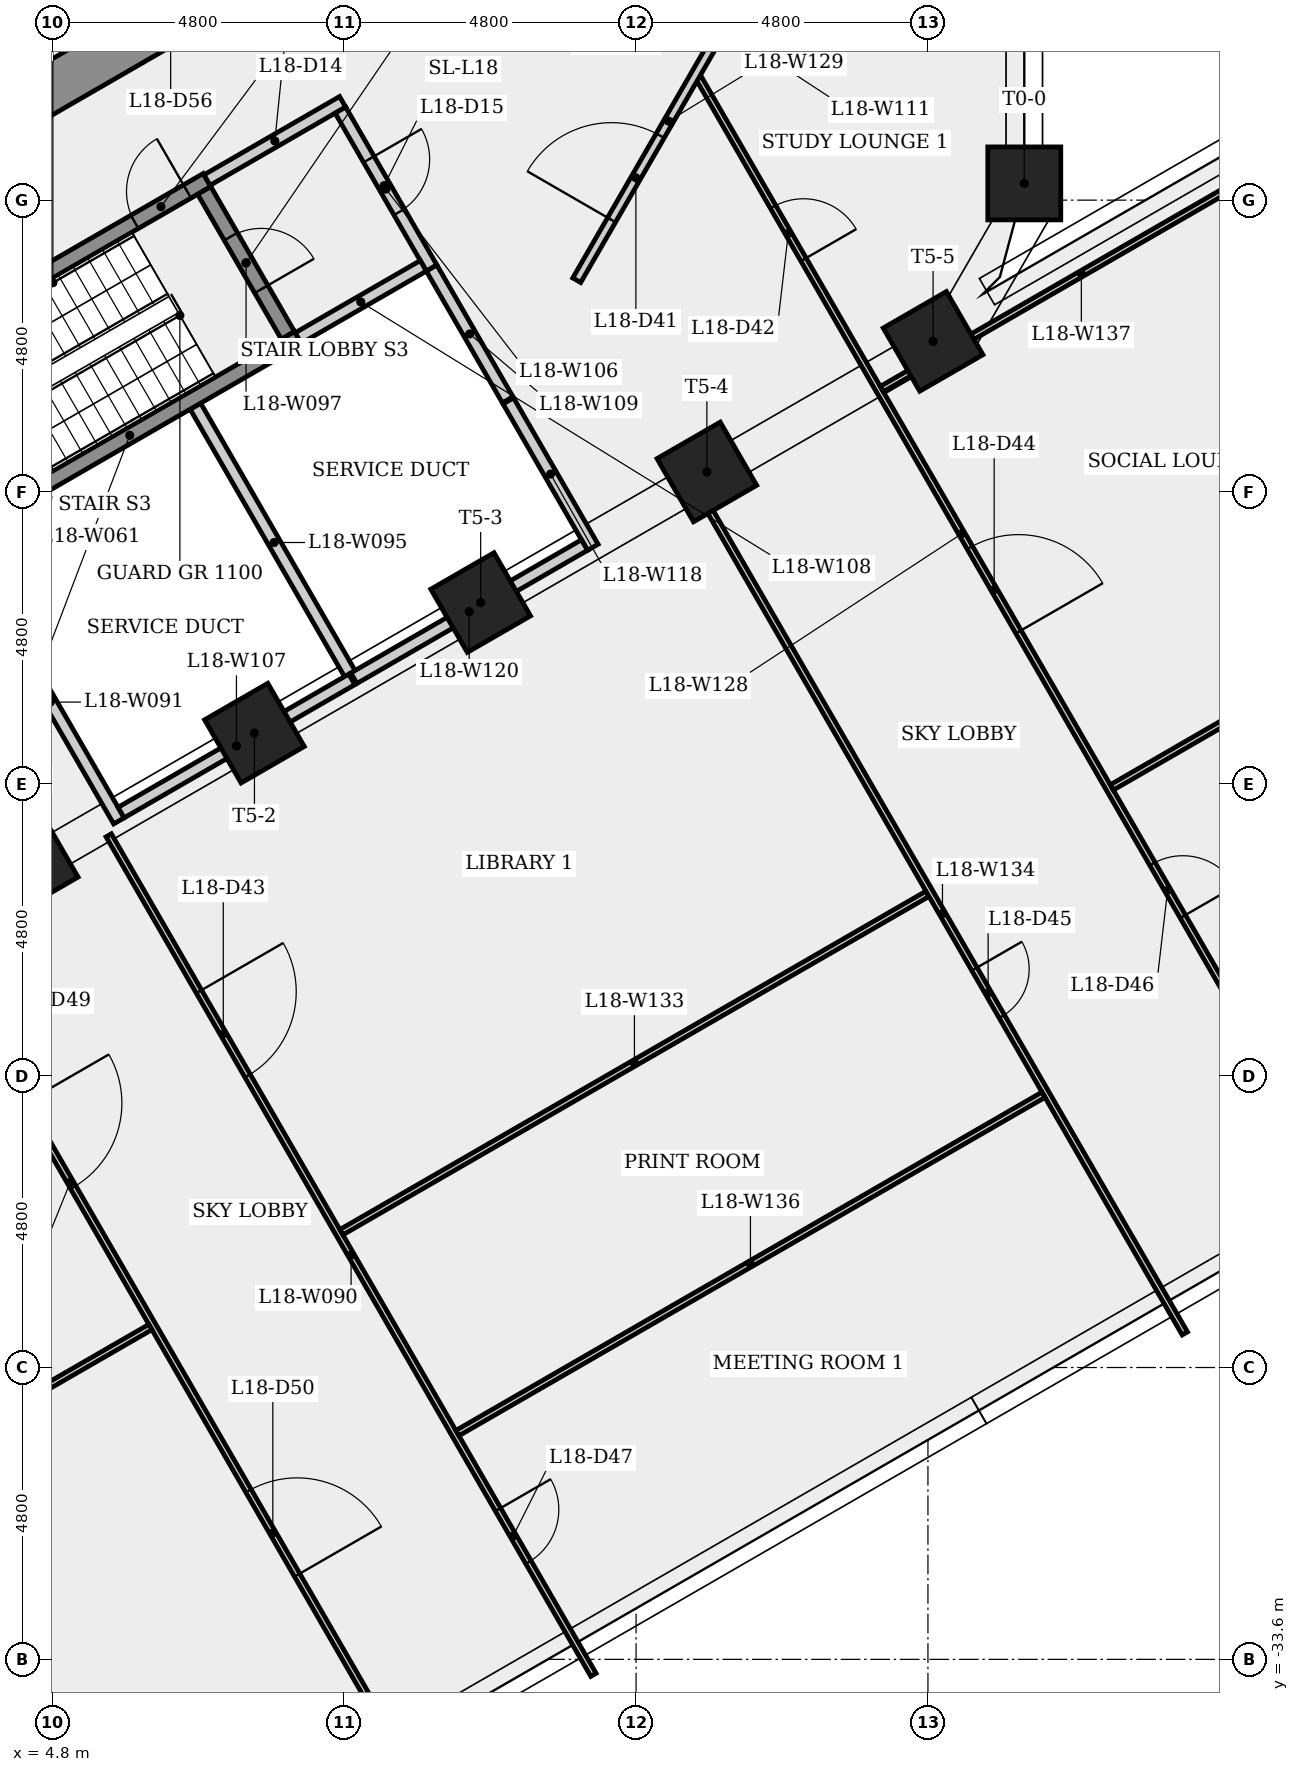
"""IFC4 building model, lengths in metres.
Left out: names, types, materials, properties, quantities, classifications, styles, units other than length and angle.
Written with IfcOpenShell. Run it as: python <this file> out.ifc"""

import sys

from ifc_helpers import new_model, si_unit, direction, frame, frame_2d, origin, origin_2d, place, context, subcontext, project, spatial, rectangle, extrude, element, fill, save


model = new_model("IFC4")
c1 = context("Model", 3, precision=1e-05, world=origin(), true_north=direction((0.0, 1.0)))
c2 = subcontext(c1, "Body", "Model", "MODEL_VIEW")
j1 = project(units=[si_unit("LENGTHUNIT", "METRE"), si_unit("PLANEANGLEUNIT", "RADIAN")], contexts=[c1])
p1 = place(None, origin())
s1 = spatial("IfcSite", under=j1, at=p1, CompositionType="ELEMENT")
p2 = place(p1, origin())
s2 = spatial("IfcBuilding", under=s1, at=p2, CompositionType="ELEMENT")
p3 = place(p2, frame((0.0, 0.0, 70.3)))
s3 = spatial("IfcBuildingStorey", under=s2, at=p3, CompositionType="ELEMENT", Elevation=70.3)
p4 = place(p3, frame((-0.2, -10.623, 0.0), z_axis=(0.0, 0.0, 1.0), x_axis=(0.866023993627, 0.500002442456, 0.0)))
e1 = element("IfcWall", 1, at=p4, inside=s3, PredefinedType="SHEAR", context=c2, shape_type="SweptSolid", body=[
    extrude(rectangle(XDim=10.97, YDim=0.8, at=frame_2d((5.485, 0.0))), origin(), (0.0, 0.0, 1.0), 4.0),
])
p5 = place(p4, frame((7.57, 0.0, 0.0)))
e2 = element("IfcOpeningElement", 2, at=p5, cuts=e1, PredefinedType="OPENING", context=c2, shape_type="SweptSolid", body=[
    extrude(rectangle(XDim=0.9, YDim=2.1, at=frame_2d((0.45, 1.05))), frame((0.0, 0.41, 0.0), z_axis=(0.0, -1.0, 0.0), x_axis=(1.0, 0.0, 0.0)), (0.0, 0.0, 1.0), 0.82),
])
for number, where, z_axis, x_axis in (
    (3, (20.785, -9.325, 0.0), (0.0, 0.0, 1.0), (1.0, 0.0, 0.0)),
    (4, (4.403, -20.514, 0.0), (0.0, 0.0, 1.0), (0.5, -0.866, 0.0)),
    (5, (8.124, -18.366, 0.0), (0.0, 0.0, 1.0), (0.5, -0.866, 0.0)),
    (6, (11.844, -16.219, 0.0), (0.0, 0.0, 1.0), (0.5, -0.866, 0.0)),
    (7, (15.564, -14.071, 0.0), (0.0, 0.0, 1.0), (0.5, -0.866, 0.0)),
    (8, (19.285, -11.923, 0.0), (0.0, 0.0, 1.0), (0.5, -0.866, 0.0)),
):
    element("IfcColumn", number, at=place(p3, frame(where, z_axis=z_axis, x_axis=x_axis)), inside=s3, PredefinedType="COLUMN", context=c2, shape_type="SweptSolid", body=[
        extrude(rectangle(XDim=1.2, YDim=1.2, at=origin_2d()), origin(), (0.0, 0.0, 1.0), 4.0),
    ])
p6 = place(p3, frame((1.585, -12.595, 0.0), z_axis=(0.0, 0.0, 1.0), x_axis=(0.866036417653, 0.499980922934, 0.0)))
e9 = element("IfcWall", 9, at=p6, inside=s3, PredefinedType="SHEAR", context=c2, shape_type="SweptSolid", body=[
    extrude(rectangle(XDim=6.65, YDim=0.25, at=frame_2d((3.325, 0.0))), origin(), (0.0, 0.0, 1.0), 3.6),
])
p7 = place(p6, frame((5.275, 0.0, 0.0)))
e10 = element("IfcOpeningElement", 10, at=p7, cuts=e9, PredefinedType="OPENING", context=c2, shape_type="SweptSolid", body=[
    extrude(rectangle(XDim=1.0, YDim=2.1, at=frame_2d((0.5, 1.05))), frame((0.0, 0.135, 0.0), z_axis=(0.0, -1.0, 0.0), x_axis=(1.0, 0.0, 0.0)), (0.0, 0.0, 1.0), 0.27),
])
p8 = place(p3, frame((-0.565, -15.949, 0.0), z_axis=(0.0, 0.0, 1.0), x_axis=(0.500000334318, -0.866025210766, 0.0)))
e11 = element("IfcWall", 11, at=p8, inside=s3, PredefinedType="PARTITIONING", context=c2, shape_type="SweptSolid", body=[
    extrude(rectangle(XDim=22.638, YDim=0.1, at=frame_2d((11.319, 0.0))), origin(), (0.0, 0.0, 1.0), 3.6),
])
p9 = place(p8, frame((3.081, 0.0, 0.0)))
e12 = element("IfcOpeningElement", 12, at=p9, cuts=e11, PredefinedType="OPENING", context=c2, shape_type="SweptSolid", body=[
    extrude(rectangle(XDim=1.0, YDim=2.1, at=frame_2d((0.5, 1.05))), frame((0.0, 0.06, 0.0), z_axis=(0.0, -1.0, 0.0), x_axis=(1.0, 0.0, 0.0)), (0.0, 0.0, 1.0), 0.12),
])
p10 = place(p8, frame((9.817, 0.0, 0.0)))
e13 = element("IfcOpeningElement", 13, at=p10, cuts=e11, PredefinedType="OPENING", context=c2, shape_type="SweptSolid", body=[
    extrude(rectangle(XDim=1.6, YDim=2.1, at=frame_2d((0.8, 1.05))), frame((0.0, 0.06, 0.0), z_axis=(0.0, -1.0, 0.0), x_axis=(1.0, 0.0, 0.0)), (0.0, 0.0, 1.0), 0.12),
])
p11 = place(p8, frame((17.182, 0.0, 0.0)))
e14 = element("IfcOpeningElement", 14, at=p11, cuts=e11, PredefinedType="OPENING", context=c2, shape_type="SweptSolid", body=[
    extrude(rectangle(XDim=1.6, YDim=2.1, at=frame_2d((0.8, 1.05))), frame((0.0, 0.06, 0.0), z_axis=(0.0, -1.0, 0.0), x_axis=(1.0, 0.0, 0.0)), (0.0, 0.0, 1.0), 0.12),
])
p12 = place(p3, frame((5.727, -20.047, 0.0), z_axis=(0.0, 0.0, 1.0), x_axis=(0.49999285859, -0.86602952684, 0.0)))
e15 = element("IfcWall", 15, at=p12, inside=s3, PredefinedType="PARTITIONING", context=c2, shape_type="SweptSolid", body=[
    extrude(rectangle(XDim=15.944, YDim=0.1, at=frame_2d((7.972, 0.0))), origin(), (0.0, 0.0, 1.0), 3.6),
])
p13 = place(p12, frame((2.968, 0.0, 0.0)))
e16 = element("IfcOpeningElement", 16, at=p13, cuts=e15, PredefinedType="OPENING", context=c2, shape_type="SweptSolid", body=[
    extrude(rectangle(XDim=1.6, YDim=2.1, at=frame_2d((0.8, 1.05))), frame((0.0, 0.06, 0.0), z_axis=(0.0, -1.0, 0.0), x_axis=(1.0, 0.0, 0.0)), (0.0, 0.0, 1.0), 0.12),
])
p14 = place(p12, frame((12.805, 0.0, 0.0)))
e17 = element("IfcOpeningElement", 17, at=p14, cuts=e15, PredefinedType="OPENING", context=c2, shape_type="SweptSolid", body=[
    extrude(rectangle(XDim=1.0, YDim=2.1, at=frame_2d((0.5, 1.05))), frame((0.0, 0.06, 0.0), z_axis=(0.0, -1.0, 0.0), x_axis=(1.0, 0.0, 0.0)), (0.0, 0.0, 1.0), 0.12),
])
p15 = place(p3, frame((5.894, -19.809, 0.0), z_axis=(0.0, 0.0, 1.0), x_axis=(-0.499980071345, 0.866036909293, 0.0)))
e18 = element("IfcWall", 18, at=p15, inside=s3, PredefinedType="PLUMBINGWALL", context=c2, shape_type="SweptSolid", body=[
    extrude(rectangle(XDim=4.512, YDim=0.2, at=frame_2d((2.256, 0.0))), origin(), (0.0, 0.0, 1.0), 3.6),
])
p16 = place(p3, frame((6.412, -28.134, 0.0), z_axis=(0.0, 0.0, 1.0), x_axis=(-0.86603149334, -0.499989452433, 0.0)))
e19 = element("IfcWall", 19, at=p16, inside=s3, PredefinedType="PARTITIONING", context=c2, shape_type="SweptSolid", body=[
    extrude(rectangle(XDim=13.482, YDim=0.1, at=frame_2d((6.741, 0.0))), origin(), (0.0, 0.0, 1.0), 3.6),
])
p17 = place(p3, frame((7.153, -12.989, 0.0), z_axis=(0.0, 0.0, 1.0), x_axis=(0.499993196246, -0.866029331898, 0.0)))
e20 = element("IfcWall", 20, at=p17, inside=s3, PredefinedType="PLUMBINGWALL", context=c2, shape_type="SweptSolid", body=[
    extrude(rectangle(XDim=5.178, YDim=0.2, at=frame_2d((2.589, 0.0))), origin(), (0.0, 0.0, 1.0), 3.6),
])
p18 = place(p3, frame((3.301, -15.068, 0.0), z_axis=(0.0, 0.0, 1.0), x_axis=(0.866035036182, 0.499983315828, 0.0)))
e21 = element("IfcWall", 21, at=p18, inside=s3, PredefinedType="SHEAR", context=c2, shape_type="SweptSolid", body=[
    extrude(rectangle(XDim=6.4, YDim=0.25, at=frame_2d((3.2, 0.0))), origin(), (0.0, 0.0, 1.0), 4.0),
])
p19 = place(p3, frame((7.298, -9.441, 0.0), z_axis=(0.0, 0.0, 1.0), x_axis=(0.500034990121, -0.866005201286, 0.0)))
e22 = element("IfcWall", 22, at=p19, inside=s3, PredefinedType="SHEAR", context=c2, shape_type="SweptSolid", body=[
    extrude(rectangle(XDim=2.75, YDim=0.25, at=frame_2d((1.375, 0.0))), origin(), (0.0, 0.0, 1.0), 3.6),
])
p20 = place(p19, frame((0.875, 0.0, 0.0)))
e23 = element("IfcOpeningElement", 23, at=p20, cuts=e22, PredefinedType="OPENING", context=c2, shape_type="SweptSolid", body=[
    extrude(rectangle(XDim=1.0, YDim=2.1, at=frame_2d((0.5, 1.05))), frame((0.0, 0.135, 0.0), z_axis=(0.0, -1.0, 0.0), x_axis=(1.0, 0.0, 0.0)), (0.0, 0.0, 1.0), 0.27),
])
p21 = place(p3, frame((7.344, -9.27, 0.0), z_axis=(0.0, 0.0, 1.0), x_axis=(0.866005588531, 0.500034319456, 0.0)))
e24 = element("IfcWall", 24, at=p21, inside=s3, PredefinedType="PARTITIONING", context=c2, shape_type="SweptSolid", body=[
    extrude(rectangle(XDim=2.575, YDim=0.2, at=frame_2d((1.288, 0.0))), origin(), (0.0, 0.0, 1.0), 3.6),
])
p22 = place(p3, frame((9.537, -8.119, 0.0), z_axis=(0.0, 0.0, 1.0), x_axis=(0.499990139034, -0.866031096941, 0.0)))
e25 = element("IfcWall", 25, at=p22, inside=s3, PredefinedType="PARTITIONING", context=c2, shape_type="SweptSolid", body=[
    extrude(rectangle(XDim=3.0, YDim=0.2, at=frame_2d((1.5, 0.0))), origin(), (0.0, 0.0, 1.0), 3.6),
])
p23 = place(p22, frame((0.935, 0.0, 0.0)))
e26 = element("IfcOpeningElement", 26, at=p23, cuts=e25, PredefinedType="OPENING", context=c2, shape_type="SweptSolid", body=[
    extrude(rectangle(XDim=1.0, YDim=2.1, at=frame_2d((0.5, 1.05))), frame((0.0, 0.11, 0.0), z_axis=(0.0, -1.0, 0.0), x_axis=(1.0, 0.0, 0.0)), (0.0, 0.0, 1.0), 0.22),
])
p24 = place(p3, frame((9.724, -17.483, 0.0), z_axis=(0.0, 0.0, 1.0), x_axis=(-0.866032430508, -0.49998782916, 0.0)))
e27 = element("IfcWall", 27, at=p24, inside=s3, PredefinedType="PLUMBINGWALL", context=c2, shape_type="SweptSolid", body=[
    extrude(rectangle(XDim=4.38, YDim=0.2, at=frame_2d((2.19, 0.0))), origin(), (0.0, 0.0, 1.0), 2.675),
])
p25 = place(p3, frame((10.901, -10.681, 0.0), z_axis=(0.0, 0.0, 1.0), x_axis=(-0.866007538022, -0.500030943131, 0.0)))
e28 = element("IfcWall", 28, at=p25, inside=s3, PredefinedType="PLUMBINGWALL", context=c2, shape_type="SweptSolid", body=[
    extrude(rectangle(XDim=2.375, YDim=0.2, at=frame_2d((1.188, 0.0))), origin(), (0.0, 0.0, 1.0), 3.6),
])
p26 = place(p3, frame((11.037, -10.717, 0.0), z_axis=(0.0, 0.0, 1.0), x_axis=(0.499989877761, -0.866031247783, 0.0)))
e29 = element("IfcWall", 29, at=p26, inside=s3, PredefinedType="PLUMBINGWALL", context=c2, shape_type="SweptSolid", body=[
    extrude(rectangle(XDim=2.502, YDim=0.2, at=frame_2d((1.251, 0.0))), origin(), (0.0, 0.0, 1.0), 3.6),
])
p27 = place(p3, frame((12.299, -12.902, 0.0), z_axis=(0.0, 0.0, 1.0), x_axis=(0.500049332001, -0.865996920067, 0.0)))
e30 = element("IfcWall", 30, at=p27, inside=s3, PredefinedType="PLUMBINGWALL", context=c2, shape_type="SweptSolid", body=[
    extrude(rectangle(XDim=2.78, YDim=0.2, at=frame_2d((1.39, 0.0))), origin(), (0.0, 0.0, 1.0), 3.6),
])
p28 = place(p3, frame((13.552, -15.273, 0.0), z_axis=(0.0, 0.0, 1.0), x_axis=(-0.866008294434, -0.500029633093, 0.0)))
e31 = element("IfcWall", 31, at=p28, inside=s3, PredefinedType="PLUMBINGWALL", context=c2, shape_type="SweptSolid", body=[
    extrude(rectangle(XDim=4.38, YDim=0.2, at=frame_2d((2.19, 0.0))), origin(), (0.0, 0.0, 1.0), 2.675),
])
p29 = place(p3, frame((15.425, -7.583, 0.0), z_axis=(0.0, 0.0, 1.0), x_axis=(0.499995650065, -0.866027915206, 0.0)))
e32 = element("IfcWall", 32, at=p29, inside=s3, PredefinedType="PARTITIONING", context=c2, shape_type="SweptSolid", body=[
    extrude(rectangle(XDim=17.328, YDim=0.1, at=frame_2d((8.664, 0.0))), origin(), (0.0, 0.0, 1.0), 3.6),
])
p30 = place(p29, frame((2.458, 0.0, 0.0)))
e33 = element("IfcOpeningElement", 33, at=p30, cuts=e32, PredefinedType="OPENING", context=c2, shape_type="SweptSolid", body=[
    extrude(rectangle(XDim=1.0, YDim=2.1, at=frame_2d((0.5, 1.05))), frame((0.0, 0.06, 0.0), z_axis=(0.0, -1.0, 0.0), x_axis=(1.0, 0.0, 0.0)), (0.0, 0.0, 1.0), 0.12),
])
p31 = place(p29, frame((8.929, 0.0, 0.0)))
e34 = element("IfcOpeningElement", 34, at=p31, cuts=e32, PredefinedType="OPENING", context=c2, shape_type="SweptSolid", body=[
    extrude(rectangle(XDim=1.6, YDim=2.1, at=frame_2d((0.8, 1.05))), frame((0.0, 0.06, 0.0), z_axis=(0.0, -1.0, 0.0), x_axis=(1.0, 0.0, 0.0)), (0.0, 0.0, 1.0), 0.12),
])
p32 = place(p29, frame((14.935, 0.0, 0.0)))
e35 = element("IfcOpeningElement", 35, at=p32, cuts=e32, PredefinedType="OPENING", context=c2, shape_type="SweptSolid", body=[
    extrude(rectangle(XDim=1.0, YDim=2.1, at=frame_2d((0.5, 1.05))), frame((0.0, 0.06, 0.0), z_axis=(0.0, -1.0, 0.0), x_axis=(1.0, 0.0, 0.0)), (0.0, 0.0, 1.0), 0.12),
])
p33 = place(p3, frame((13.424, -10.918, 0.0), z_axis=(0.0, 0.0, 1.0), x_axis=(0.499992877875, 0.866029515706, 0.0)))
e36 = element("IfcWall", 36, at=p33, inside=s3, PredefinedType="PARTITIONING", context=c2, shape_type="SweptSolid", body=[
    extrude(rectangle(XDim=6.043, YDim=0.15, at=frame_2d((3.022, 0.0))), origin(), (0.0, 0.0, 1.0), 3.6),
])
p34 = place(p33, frame((1.146, 0.0, 0.0)))
e37 = element("IfcOpeningElement", 37, at=p34, cuts=e36, PredefinedType="OPENING", context=c2, shape_type="SweptSolid", body=[
    extrude(rectangle(XDim=1.6, YDim=2.1, at=frame_2d((0.8, 1.05))), frame((0.0, 0.085, 0.0), z_axis=(0.0, -1.0, 0.0), x_axis=(1.0, 0.0, 0.0)), (0.0, 0.0, 1.0), 0.17),
])
p35 = place(p3, frame((19.193, -21.009, 0.0), z_axis=(0.0, 0.0, 1.0), x_axis=(-0.866020851292, -0.500007885066, 0.0)))
e38 = element("IfcWall", 38, at=p35, inside=s3, PredefinedType="PARTITIONING", context=c2, shape_type="SweptSolid", body=[
    extrude(rectangle(XDim=11.131, YDim=0.1, at=frame_2d((5.565, 0.0))), origin(), (0.0, 0.0, 1.0), 3.6),
])
p36 = place(p3, frame((15.453, -14.432, 0.0), z_axis=(0.0, 0.0, 1.0), x_axis=(0.49999285859, -0.86602952684, 0.0)))
e39 = element("IfcWall", 39, at=p36, inside=s3, PredefinedType="PARTITIONING", context=c2, shape_type="SweptSolid", body=[
    extrude(rectangle(XDim=15.944, YDim=0.1, at=frame_2d((7.972, 0.0))), origin(), (0.0, 0.0, 1.0), 3.6),
])
p37 = place(p36, frame((9.024, 0.0, 0.0)))
e40 = element("IfcOpeningElement", 40, at=p37, cuts=e39, PredefinedType="OPENING", context=c2, shape_type="SweptSolid", body=[
    extrude(rectangle(XDim=0.9, YDim=2.1, at=frame_2d((0.45, 1.05))), frame((0.0, 0.06, 0.0), z_axis=(0.0, -1.0, 0.0), x_axis=(1.0, 0.0, 0.0)), (0.0, 0.0, 1.0), 0.12),
])
p38 = place(p3, frame((21.101, -24.314, 0.0), z_axis=(0.0, 0.0, 1.0), x_axis=(-0.866030349048, -0.499991434454, 0.0)))
e41 = element("IfcWall", 41, at=p38, inside=s3, PredefinedType="PARTITIONING", context=c2, shape_type="SweptSolid", body=[
    extrude(rectangle(XDim=11.131, YDim=0.1, at=frame_2d((5.565, 0.0))), origin(), (0.0, 0.0, 1.0), 3.6),
])
p39 = place(p3, frame((25.005, -8.917, 0.0), z_axis=(0.0, 0.0, 1.0), x_axis=(-0.866026268399, -0.49999850244, 0.0)))
e42 = element("IfcWall", 42, at=p39, inside=s3, PredefinedType="PARTITIONING", context=c2, shape_type="SweptSolid", body=[
    extrude(rectangle(XDim=7.579, YDim=0.1, at=frame_2d((3.79, 0.0))), origin(), (0.0, 0.0, 1.0), 2.675),
])
p40 = place(p3, frame((28.788, -15.469, 0.0), z_axis=(0.0, 0.0, 1.0), x_axis=(-0.866034321076, -0.49998455448, 0.0)))
e43 = element("IfcWall", 43, at=p40, inside=s3, PredefinedType="PARTITIONING", context=c2, shape_type="SweptSolid", body=[
    extrude(rectangle(XDim=7.579, YDim=0.1, at=frame_2d((3.79, 0.0))), origin(), (0.0, 0.0, 1.0), 3.6),
])
p41 = place(p7, origin())
e44 = element("IfcDoor", 44, at=p41, inside=s3, OperationType="SINGLE_SWING_RIGHT", PredefinedType="DOOR", context=c2, shape_type="SweptSolid", body=[
    extrude(rectangle(XDim=1.0, YDim=2.1, at=frame_2d((0.5, 1.05))), frame((0.0, 0.025, 0.0), z_axis=(0.0, -1.0, 0.0), x_axis=(1.0, 0.0, 0.0)), (0.0, 0.0, 1.0), 0.05),
])
fill(e10, e44)
p42 = place(p23, origin())
e45 = element("IfcDoor", 45, at=p42, inside=s3, OperationType="SINGLE_SWING_LEFT", PredefinedType="DOOR", context=c2, shape_type="SweptSolid", body=[
    extrude(rectangle(XDim=1.0, YDim=2.1, at=frame_2d((0.5, 1.05))), frame((0.0, 0.025, 0.0), z_axis=(0.0, -1.0, 0.0), x_axis=(1.0, 0.0, 0.0)), (0.0, 0.0, 1.0), 0.05),
])
fill(e26, e45)
p43 = place(p20, origin())
e46 = element("IfcDoor", 46, at=p43, inside=s3, OperationType="SINGLE_SWING_RIGHT", PredefinedType="DOOR", context=c2, shape_type="SweptSolid", body=[
    extrude(rectangle(XDim=1.0, YDim=2.1, at=frame_2d((0.5, 1.05))), frame((0.0, 0.025, 0.0), z_axis=(0.0, -1.0, 0.0), x_axis=(1.0, 0.0, 0.0)), (0.0, 0.0, 1.0), 0.05),
])
fill(e23, e46)
p44 = place(p34, origin())
e47 = element("IfcDoor", 47, at=p44, inside=s3, OperationType="SINGLE_SWING_LEFT", PredefinedType="DOOR", context=c2, shape_type="SweptSolid", body=[
    extrude(rectangle(XDim=1.6, YDim=2.1, at=frame_2d((0.8, 1.05))), frame((0.0, 0.025, 0.0), z_axis=(0.0, -1.0, 0.0), x_axis=(1.0, 0.0, 0.0)), (0.0, 0.0, 1.0), 0.05),
])
fill(e37, e47)
p45 = place(p30, origin())
e48 = element("IfcDoor", 48, at=p45, inside=s3, OperationType="SINGLE_SWING_RIGHT", PredefinedType="DOOR", context=c2, shape_type="SweptSolid", body=[
    extrude(rectangle(XDim=1.0, YDim=2.1, at=frame_2d((0.5, 1.05))), frame((0.0, 0.025, 0.0), z_axis=(0.0, -1.0, 0.0), x_axis=(1.0, 0.0, 0.0)), (0.0, 0.0, 1.0), 0.05),
])
fill(e33, e48)
p46 = place(p13, origin())
e49 = element("IfcDoor", 49, at=p46, inside=s3, OperationType="SINGLE_SWING_LEFT", PredefinedType="DOOR", context=c2, shape_type="SweptSolid", body=[
    extrude(rectangle(XDim=1.6, YDim=2.1, at=frame_2d((0.8, 1.05))), frame((0.0, 0.025, 0.0), z_axis=(0.0, -1.0, 0.0), x_axis=(1.0, 0.0, 0.0)), (0.0, 0.0, 1.0), 0.05),
])
fill(e16, e49)
p47 = place(p31, origin())
e50 = element("IfcDoor", 50, at=p47, inside=s3, OperationType="SINGLE_SWING_RIGHT", PredefinedType="DOOR", context=c2, shape_type="SweptSolid", body=[
    extrude(rectangle(XDim=1.6, YDim=2.1, at=frame_2d((0.8, 1.05))), frame((0.0, 0.025, 0.0), z_axis=(0.0, -1.0, 0.0), x_axis=(1.0, 0.0, 0.0)), (0.0, 0.0, 1.0), 0.05),
])
fill(e34, e50)
p48 = place(p37, origin())
e51 = element("IfcDoor", 51, at=p48, inside=s3, OperationType="SINGLE_SWING_LEFT", PredefinedType="DOOR", context=c2, shape_type="SweptSolid", body=[
    extrude(rectangle(XDim=0.9, YDim=2.1, at=frame_2d((0.45, 1.05))), frame((0.0, 0.025, 0.0), z_axis=(0.0, -1.0, 0.0), x_axis=(1.0, 0.0, 0.0)), (0.0, 0.0, 1.0), 0.05),
])
fill(e40, e51)
p49 = place(p32, origin())
e52 = element("IfcDoor", 52, at=p49, inside=s3, OperationType="SINGLE_SWING_RIGHT", PredefinedType="DOOR", context=c2, shape_type="SweptSolid", body=[
    extrude(rectangle(XDim=1.0, YDim=2.1, at=frame_2d((0.5, 1.05))), frame((0.0, 0.025, 0.0), z_axis=(0.0, -1.0, 0.0), x_axis=(1.0, 0.0, 0.0)), (0.0, 0.0, 1.0), 0.05),
])
fill(e35, e52)
p50 = place(p14, origin())
e53 = element("IfcDoor", 53, at=p50, inside=s3, OperationType="SINGLE_SWING_LEFT", PredefinedType="DOOR", context=c2, shape_type="SweptSolid", body=[
    extrude(rectangle(XDim=1.0, YDim=2.1, at=frame_2d((0.5, 1.05))), frame((0.0, 0.025, 0.0), z_axis=(0.0, -1.0, 0.0), x_axis=(1.0, 0.0, 0.0)), (0.0, 0.0, 1.0), 0.05),
])
fill(e17, e53)
p51 = place(p10, origin())
e54 = element("IfcDoor", 54, at=p51, inside=s3, OperationType="SINGLE_SWING_LEFT", PredefinedType="DOOR", context=c2, shape_type="SweptSolid", body=[
    extrude(rectangle(XDim=1.6, YDim=2.1, at=frame_2d((0.8, 1.05))), frame((0.0, 0.025, 0.0), z_axis=(0.0, -1.0, 0.0), x_axis=(1.0, 0.0, 0.0)), (0.0, 0.0, 1.0), 0.05),
])
fill(e13, e54)
p52 = place(p11, origin())
e55 = element("IfcDoor", 55, at=p52, inside=s3, OperationType="SINGLE_SWING_RIGHT", PredefinedType="DOOR", context=c2, shape_type="SweptSolid", body=[
    extrude(rectangle(XDim=1.6, YDim=2.1, at=frame_2d((0.8, 1.05))), frame((0.0, 0.025, 0.0), z_axis=(0.0, -1.0, 0.0), x_axis=(1.0, 0.0, 0.0)), (0.0, 0.0, 1.0), 0.05),
])
fill(e14, e55)
save(model, sys.argv[1])
